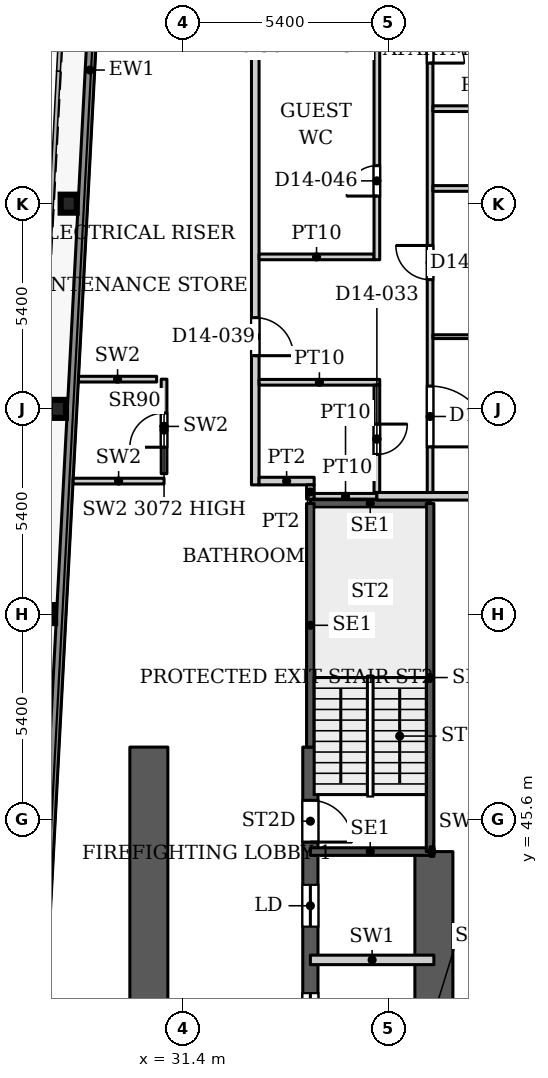
"""IFC4 building model, lengths in metres.
Left out: names, types, materials, properties, quantities, classifications, styles, units other than length and angle.
Written with IfcOpenShell. Run it as: python <this file> out.ifc"""

import sys

from ifc_helpers import new_model, si_unit, direction, frame, frame_2d, origin, origin_2d, place, context, subcontext, project, spatial, rectangle, i_section, extrude, source, transform, mapped, element, fill, save


model = new_model("IFC4")
c1 = context("Model", 3, precision=1e-05, world=origin(), true_north=direction((0.0, 1.0)))
c2 = subcontext(c1, "Body", "Model", "MODEL_VIEW")
j1 = project(units=[si_unit("LENGTHUNIT", "METRE"), si_unit("PLANEANGLEUNIT", "RADIAN")], contexts=[c1])
p1 = place(None, origin())
s1 = spatial("IfcSite", under=j1, at=p1, CompositionType="ELEMENT")
p2 = place(p1, origin())
s2 = spatial("IfcBuilding", under=s1, at=p2, CompositionType="ELEMENT")
p3 = place(p2, frame((0.0, 0.0, 65.6)))
s3 = spatial("IfcBuildingStorey", under=s2, at=p3, CompositionType="ELEMENT", Elevation=65.6)
for number, where, z_axis, x_axis in (
    (1, (27.822, 51.0, 0.0), (0.0, 0.0, 1.0), (1.0, 0.0, 0.0)),
    (2, (28.106, 56.4, 0.0), (0.0, 0.0, 1.0), (1.0, 0.0, 0.0)),
    (3, (28.39, 61.8, 0.0), (0.0, 0.0, 1.0), (1.0, 0.0, 0.0)),
):
    element("IfcColumn", number, at=place(p3, frame(where, z_axis=z_axis, x_axis=x_axis)), inside=s3, PredefinedType="COLUMN", context=c2, shape_type="SweptSolid", body=[
        extrude(i_section(OverallWidth=0.424, OverallDepth=0.474, WebThickness=0.048, FlangeThickness=0.077, FilletRadius=0.014, at=origin_2d()), origin(), (0.0, 0.0, 1.0), 3.9),
    ])
p4 = place(p3, frame((34.75, 29.05, 0.0), z_axis=(0.0, 0.0, 1.0), x_axis=(0.0, 1.0, 0.0)))
e4 = element("IfcWall", 4, at=p4, inside=s3, PredefinedType="SHEAR", context=c2, shape_type="SweptSolid", body=[
    extrude(rectangle(XDim=18.45, YDim=0.4, at=frame_2d((9.225, 0.0))), origin(), (0.0, 0.0, 1.0), 3.9),
])
p5 = place(p4, frame((8.025, 0.0, 0.0)))
e5 = element("IfcOpeningElement", 5, at=p5, cuts=e4, PredefinedType="OPENING", context=c2, shape_type="SweptSolid", body=[
    extrude(rectangle(XDim=1.1, YDim=2.2, at=frame_2d((0.55, 1.1))), frame((0.0, 0.21, 0.0), z_axis=(0.0, -1.0, 0.0), x_axis=(1.0, 0.0, 0.0)), (0.0, 0.0, 1.0), 0.42),
])
p6 = place(p4, frame((10.875, 0.0, 0.0)))
e6 = element("IfcOpeningElement", 6, at=p6, cuts=e4, PredefinedType="OPENING", context=c2, shape_type="SweptSolid", body=[
    extrude(rectangle(XDim=1.1, YDim=2.2, at=frame_2d((0.55, 1.1))), frame((0.0, 0.21, 0.0), z_axis=(0.0, -1.0, 0.0), x_axis=(1.0, 0.0, 0.0)), (0.0, 0.0, 1.0), 0.42),
])
p7 = place(p4, frame((13.725, 0.0, 0.0)))
e7 = element("IfcOpeningElement", 7, at=p7, cuts=e4, PredefinedType="OPENING", context=c2, shape_type="SweptSolid", body=[
    extrude(rectangle(XDim=1.1, YDim=2.2, at=frame_2d((0.55, 1.1))), frame((0.0, 0.21, 0.0), z_axis=(0.0, -1.0, 0.0), x_axis=(1.0, 0.0, 0.0)), (0.0, 0.0, 1.0), 0.42),
])
p8 = place(p4, frame((15.95, 0.0, 0.0)))
e8 = element("IfcOpeningElement", 8, at=p8, cuts=e4, PredefinedType="OPENING", context=c2, shape_type="SweptSolid", body=[
    extrude(rectangle(XDim=1.1, YDim=2.2, at=frame_2d((0.55, 1.1))), frame((0.0, 0.21, 0.0), z_axis=(0.0, -1.0, 0.0), x_axis=(1.0, 0.0, 0.0)), (0.0, 0.0, 1.0), 0.42),
])
p9 = place(p3, frame((38.0, 36.2, 0.0), z_axis=(0.0, 0.0, 1.0), x_axis=(0.0, 1.0, 0.0)))
e9 = element("IfcWall", 9, at=p9, inside=s3, PredefinedType="SHEAR", context=c2, shape_type="SweptSolid", body=[
    extrude(rectangle(XDim=8.55, YDim=1.0, at=frame_2d((4.275, 0.0))), origin(), (0.0, 0.0, 1.0), 3.9),
])
p10 = place(p3, frame((30.5, 29.05, 0.0), z_axis=(0.0, 0.0, 1.0), x_axis=(0.0, 1.0, 0.0)))
e10 = element("IfcWall", 10, at=p10, inside=s3, PredefinedType="SHEAR", context=c2, shape_type="SweptSolid", body=[
    extrude(rectangle(XDim=18.45, YDim=1.0, at=frame_2d((9.225, 0.0))), origin(), (0.0, 0.0, 1.0), 3.9),
])
p11 = place(p10, frame((1.147, 0.0, 0.0)))
e11 = element("IfcOpeningElement", 11, at=p11, cuts=e10, PredefinedType="OPENING", context=c2, shape_type="SweptSolid", body=[
    extrude(rectangle(XDim=0.9, YDim=2.2, at=frame_2d((0.45, 1.1))), frame((0.0, 0.51, 0.0), z_axis=(0.0, -1.0, 0.0), x_axis=(1.0, 0.0, 0.0)), (0.0, 0.0, 1.0), 1.02),
])
p12 = place(p10, frame((7.925, 0.0, 0.0)))
e12 = element("IfcOpeningElement", 12, at=p12, cuts=e10, PredefinedType="OPENING", context=c2, shape_type="SweptSolid", body=[
    extrude(rectangle(XDim=0.9, YDim=2.2, at=frame_2d((0.45, 1.1))), frame((0.0, 0.51, 0.0), z_axis=(0.0, -1.0, 0.0), x_axis=(1.0, 0.0, 0.0)), (0.0, 0.0, 1.0), 1.02),
])
p13 = place(p3, frame((27.195, 31.969, 0.0), z_axis=(0.0, 0.0, 1.0), x_axis=(0.052554995867, 0.998618031286, 0.0)))
e13 = element("IfcWall", 13, at=p13, inside=s3, PredefinedType="SOLIDWALL", context=c2, shape_type="SweptSolid", body=[
    extrude(rectangle(XDim=66.787, YDim=0.25, at=frame_2d((33.394, 0.0))), origin(), (0.0, 0.0, 1.0), 3.75),
])
for number, where, z_axis, x_axis in (
    (14, (34.75, 44.75, 0.0), (0.0, 0.0, 1.0), (1.0, 0.0, 0.0)),
    (15, (34.75, 53.91, 0.0), (0.0, 0.0, 1.0), (1.0, 0.0, 0.0)),
):
    element("IfcWall", number, at=place(p3, frame(where, z_axis=z_axis, x_axis=x_axis)), inside=s3, PredefinedType="SHEAR", context=c2, shape_type="SweptSolid", body=[
        extrude(rectangle(XDim=3.15, YDim=0.2, at=frame_2d((1.575, 0.0))), origin(), (0.0, 0.0, 1.0), 3.9),
    ])
p14 = place(p3, frame((34.75, 47.5, 0.0), z_axis=(0.0, 0.0, 1.0), x_axis=(0.0, 1.0, 0.0)))
e16 = element("IfcWall", 16, at=p14, inside=s3, PredefinedType="SHEAR", context=c2, shape_type="SweptSolid", body=[
    extrude(rectangle(XDim=6.41, YDim=0.2, at=frame_2d((3.205, 0.0))), origin(), (0.0, 0.0, 1.0), 3.9),
])
p15 = place(p3, frame((37.9, 44.75, 0.0), z_axis=(0.0, 0.0, 1.0), x_axis=(0.0, 1.0, 0.0)))
e17 = element("IfcWall", 17, at=p15, inside=s3, PredefinedType="SHEAR", context=c2, shape_type="SweptSolid", body=[
    extrude(rectangle(XDim=9.16, YDim=0.2, at=frame_2d((4.58, 0.0))), origin(), (0.0, 0.0, 1.0), 3.9),
])
p16 = place(p3, frame((34.75, 41.9, 0.0), z_axis=(0.0, 0.0, 1.0), x_axis=(1.0, 0.0, 0.0)))
e18 = element("IfcWall", 18, at=p16, inside=s3, PredefinedType="PARTITIONING", context=c2, shape_type="SweptSolid", body=[
    extrude(rectangle(XDim=3.25, YDim=0.25, at=frame_2d((1.625, 0.0))), origin(), (0.0, 0.0, 1.0), 3.9),
])
p17 = place(p3, frame((37.9, 44.75, 0.0), z_axis=(0.0, 0.0, 1.0), x_axis=(1.0, 0.0, 0.0)))
e19 = element("IfcWall", 19, at=p17, inside=s3, PredefinedType="PARTITIONING", context=c2, shape_type="SweptSolid", body=[
    extrude(rectangle(XDim=0.1, YDim=0.25, at=frame_2d((0.05, 0.0))), origin(), (0.0, 0.0, 1.0), 3.9),
])
p18 = place(p3, frame((28.508, 54.5, 0.0), z_axis=(0.0, 0.0, 1.0), x_axis=(1.0, 0.0, 0.0)))
e20 = element("IfcWall", 20, at=p18, inside=s3, PredefinedType="PARTITIONING", context=c2, shape_type="SweptSolid", body=[
    extrude(rectangle(XDim=2.392, YDim=0.15, at=frame_2d((1.196, 0.0))), origin(), (0.0, 0.0, 1.0), 3.9),
])
p19 = place(p3, frame((30.9, 54.695, 0.0), z_axis=(0.0, 0.0, 1.0), x_axis=(0.0, 1.0, 0.0)))
e21 = element("IfcWall", 21, at=p19, inside=s3, PredefinedType="PARTITIONING", context=c2, shape_type="SweptSolid", body=[
    extrude(rectangle(XDim=2.487, YDim=0.15, at=frame_2d((1.243, 0.0))), origin(), (0.0, 0.0, 1.0), 3.072),
])
p20 = place(p19, frame((0.696, 0.0, 0.0)))
e22 = element("IfcOpeningElement", 22, at=p20, cuts=e21, PredefinedType="OPENING", context=c2, shape_type="SweptSolid", body=[
    extrude(rectangle(XDim=0.9, YDim=2.2, at=frame_2d((0.45, 1.1))), frame((0.0, 0.085, 0.0), z_axis=(0.0, -1.0, 0.0), x_axis=(1.0, 0.0, 0.0)), (0.0, 0.0, 1.0), 0.17),
])
p21 = place(p3, frame((28.649, 57.182, 0.0), z_axis=(0.0, 0.0, 1.0), x_axis=(1.0, 0.0, 0.0)))
e23 = element("IfcWall", 23, at=p21, inside=s3, PredefinedType="PARTITIONING", context=c2, shape_type="SweptSolid", body=[
    extrude(rectangle(XDim=2.056, YDim=0.15, at=frame_2d((1.028, 0.0))), origin(), (0.0, 0.0, 1.0), 3.9),
])
p22 = place(p3, frame((33.3, 54.4, 0.0), z_axis=(0.0, 0.0, 1.0), x_axis=(0.0, 1.0, 0.0)))
e24 = element("IfcWall", 24, at=p22, inside=s3, PredefinedType="PARTITIONING", context=c2, shape_type="SweptSolid", body=[
    extrude(rectangle(XDim=24.95, YDim=0.2, at=frame_2d((12.475, 0.0))), origin(), (0.0, 0.0, 1.0), 3.6),
])
p23 = place(p22, frame((3.4, 0.0, 0.0)))
e25 = element("IfcOpeningElement", 25, at=p23, cuts=e24, PredefinedType="OPENING", context=c2, shape_type="SweptSolid", body=[
    extrude(rectangle(XDim=1.0, YDim=2.1, at=frame_2d((0.5, 1.05))), frame((0.0, 0.11, 0.0), z_axis=(0.0, -1.0, 0.0), x_axis=(1.0, 0.0, 0.0)), (0.0, 0.0, 1.0), 0.22),
])
p24 = place(p3, frame((33.4, 54.5, 0.0), z_axis=(0.0, 0.0, 1.0), x_axis=(1.0, 0.0, 0.0)))
e26 = element("IfcWall", 26, at=p24, inside=s3, PredefinedType="PARTITIONING", context=c2, shape_type="SweptSolid", body=[
    extrude(rectangle(XDim=1.45, YDim=0.2, at=frame_2d((0.725, 0.0))), origin(), (0.0, 0.0, 1.0), 3.6),
])
p25 = place(p3, frame((33.4, 57.1, 0.0), z_axis=(0.0, 0.0, 1.0), x_axis=(1.0, 0.0, 0.0)))
e27 = element("IfcWall", 27, at=p25, inside=s3, PredefinedType="PARTITIONING", context=c2, shape_type="SweptSolid", body=[
    extrude(rectangle(XDim=3.175, YDim=0.15, at=frame_2d((1.587, 0.0))), origin(), (0.0, 0.0, 1.0), 3.6),
])
p26 = place(p3, frame((33.4, 60.4, 0.0), z_axis=(0.0, 0.0, 1.0), x_axis=(1.0, 0.0, 0.0)))
e28 = element("IfcWall", 28, at=p26, inside=s3, PredefinedType="PARTITIONING", context=c2, shape_type="SweptSolid", body=[
    extrude(rectangle(XDim=3.025, YDim=0.15, at=frame_2d((1.513, 0.0))), origin(), (0.0, 0.0, 1.0), 3.6),
])
p27 = place(p3, frame((34.75, 54.025, 0.0), z_axis=(0.0, 0.0, 1.0), x_axis=(0.0, 1.0, 0.0)))
e29 = element("IfcWall", 29, at=p27, inside=s3, PredefinedType="PARTITIONING", context=c2, shape_type="SweptSolid", body=[
    extrude(rectangle(XDim=0.375, YDim=0.2, at=frame_2d((0.188, 0.0))), origin(), (0.0, 0.0, 1.0), 3.6),
])
p28 = place(p3, frame((34.85, 54.1, 0.0), z_axis=(0.0, 0.0, 1.0), x_axis=(1.0, 0.0, 0.0)))
e30 = element("IfcWall", 30, at=p28, inside=s3, PredefinedType="PARTITIONING", context=c2, shape_type="SweptSolid", body=[
    extrude(rectangle(XDim=1.65, YDim=0.15, at=frame_2d((0.825, 0.0))), origin(), (0.0, 0.0, 1.0), 3.6),
])
p29 = place(p3, frame((36.5, 54.1, 0.0), z_axis=(0.0, 0.0, 1.0), x_axis=(1.0, 0.0, 0.0)))
e31 = element("IfcWall", 31, at=p29, inside=s3, PredefinedType="PARTITIONING", context=c2, shape_type="SweptSolid", body=[
    extrude(rectangle(XDim=9.4, YDim=0.2, at=frame_2d((4.7, 0.0))), origin(), (0.0, 0.0, 1.0), 3.6),
])
p30 = place(p3, frame((36.5, 54.2, 0.0), z_axis=(0.0, 0.0, 1.0), x_axis=(0.0, 1.0, 0.0)))
e32 = element("IfcWall", 32, at=p30, inside=s3, PredefinedType="PARTITIONING", context=c2, shape_type="SweptSolid", body=[
    extrude(rectangle(XDim=2.825, YDim=0.15, at=frame_2d((1.413, 0.0))), origin(), (0.0, 0.0, 1.0), 3.6),
])
p31 = place(p30, frame((1.0, 0.0, 0.0)))
e33 = element("IfcOpeningElement", 33, at=p31, cuts=e32, PredefinedType="OPENING", context=c2, shape_type="SweptSolid", body=[
    extrude(rectangle(XDim=0.8, YDim=2.1, at=frame_2d((0.4, 1.05))), frame((0.0, 0.085, 0.0), z_axis=(0.0, -1.0, 0.0), x_axis=(1.0, 0.0, 0.0)), (0.0, 0.0, 1.0), 0.17),
])
p32 = place(p3, frame((36.5, 60.325, 0.0), z_axis=(0.0, 0.0, 1.0), x_axis=(0.0, 1.0, 0.0)))
e34 = element("IfcWall", 34, at=p32, inside=s3, PredefinedType="PARTITIONING", context=c2, shape_type="SweptSolid", body=[
    extrude(rectangle(XDim=18.925, YDim=0.15, at=frame_2d((9.462, 0.0))), origin(), (0.0, 0.0, 1.0), 3.6),
])
p33 = place(p32, frame((8.075, 0.0, 0.0)))
e35 = element("IfcOpeningElement", 35, at=p33, cuts=e34, PredefinedType="OPENING", context=c2, shape_type="SweptSolid", body=[
    extrude(rectangle(XDim=0.8, YDim=2.1, at=frame_2d((0.4, 1.05))), frame((0.0, 0.085, 0.0), z_axis=(0.0, -1.0, 0.0), x_axis=(1.0, 0.0, 0.0)), (0.0, 0.0, 1.0), 0.17),
])
p34 = place(p32, frame((15.425, 0.0, 0.0)))
e36 = element("IfcOpeningElement", 36, at=p34, cuts=e34, PredefinedType="OPENING", context=c2, shape_type="SweptSolid", body=[
    extrude(rectangle(XDim=0.9, YDim=2.1, at=frame_2d((0.45, 1.05))), frame((0.0, 0.085, 0.0), z_axis=(0.0, -1.0, 0.0), x_axis=(1.0, 0.0, 0.0)), (0.0, 0.0, 1.0), 0.17),
])
p35 = place(p32, frame((12.275, 0.0, 0.0)))
e37 = element("IfcOpeningElement", 37, at=p35, cuts=e34, PredefinedType="OPENING", context=c2, shape_type="SweptSolid", body=[
    extrude(rectangle(XDim=0.8, YDim=2.1, at=frame_2d((0.4, 1.05))), frame((0.0, 0.085, 0.0), z_axis=(0.0, -1.0, 0.0), x_axis=(1.0, 0.0, 0.0)), (0.0, 0.0, 1.0), 0.17),
])
p36 = place(p32, frame((1.675, 0.0, 0.0)))
e38 = element("IfcOpeningElement", 38, at=p36, cuts=e34, PredefinedType="OPENING", context=c2, shape_type="SweptSolid", body=[
    extrude(rectangle(XDim=0.8, YDim=2.1, at=frame_2d((0.4, 1.05))), frame((0.0, 0.085, 0.0), z_axis=(0.0, -1.0, 0.0), x_axis=(1.0, 0.0, 0.0)), (0.0, 0.0, 1.0), 0.17),
])
p37 = place(p3, frame((37.9, 54.2, 0.0), z_axis=(0.0, 0.0, 1.0), x_axis=(0.0, 1.0, 0.0)))
e39 = element("IfcWall", 39, at=p37, inside=s3, PredefinedType="PARTITIONING", context=c2, shape_type="SweptSolid", body=[
    extrude(rectangle(XDim=25.05, YDim=0.15, at=frame_2d((12.525, 0.0))), origin(), (0.0, 0.0, 1.0), 3.6),
])
p38 = place(p37, frame((5.6, 0.0, 0.0)))
e40 = element("IfcOpeningElement", 40, at=p38, cuts=e39, PredefinedType="OPENING", context=c2, shape_type="SweptSolid", body=[
    extrude(rectangle(XDim=0.9, YDim=2.1, at=frame_2d((0.45, 1.05))), frame((0.0, 0.085, 0.0), z_axis=(0.0, -1.0, 0.0), x_axis=(1.0, 0.0, 0.0)), (0.0, 0.0, 1.0), 0.17),
])
p39 = place(p37, frame((14.9, 0.0, 0.0)))
e41 = element("IfcOpeningElement", 41, at=p39, cuts=e39, PredefinedType="OPENING", context=c2, shape_type="SweptSolid", body=[
    extrude(rectangle(XDim=0.9, YDim=2.1, at=frame_2d((0.45, 1.05))), frame((0.0, 0.085, 0.0), z_axis=(0.0, -1.0, 0.0), x_axis=(1.0, 0.0, 0.0)), (0.0, 0.0, 1.0), 0.17),
])
p40 = place(p37, frame((18.65, 0.0, 0.0)))
e42 = element("IfcOpeningElement", 42, at=p40, cuts=e39, PredefinedType="OPENING", context=c2, shape_type="SweptSolid", body=[
    extrude(rectangle(XDim=0.9, YDim=2.1, at=frame_2d((0.45, 1.05))), frame((0.0, 0.085, 0.0), z_axis=(0.0, -1.0, 0.0), x_axis=(1.0, 0.0, 0.0)), (0.0, 0.0, 1.0), 0.17),
])
p41 = place(p37, frame((22.5, 0.0, 0.0)))
e43 = element("IfcOpeningElement", 43, at=p41, cuts=e39, PredefinedType="OPENING", context=c2, shape_type="SweptSolid", body=[
    extrude(rectangle(XDim=1.0, YDim=2.1, at=frame_2d((0.5, 1.05))), frame((0.0, 0.085, 0.0), z_axis=(0.0, -1.0, 0.0), x_axis=(1.0, 0.0, 0.0)), (0.0, 0.0, 1.0), 0.17),
])
p42 = place(p37, frame((1.2, 0.0, 0.0)))
e44 = element("IfcOpeningElement", 44, at=p42, cuts=e39, PredefinedType="OPENING", context=c2, shape_type="SweptSolid", body=[
    extrude(rectangle(XDim=1.6, YDim=2.1, at=frame_2d((0.8, 1.05))), frame((0.0, 0.085, 0.0), z_axis=(0.0, -1.0, 0.0), x_axis=(1.0, 0.0, 0.0)), (0.0, 0.0, 1.0), 0.17),
])
p43 = place(p37, frame((11.3, 0.0, 0.0)))
e45 = element("IfcOpeningElement", 45, at=p43, cuts=e39, PredefinedType="OPENING", context=c2, shape_type="SweptSolid", body=[
    extrude(rectangle(XDim=0.9, YDim=2.1, at=frame_2d((0.45, 1.05))), frame((0.0, 0.085, 0.0), z_axis=(0.0, -1.0, 0.0), x_axis=(1.0, 0.0, 0.0)), (0.0, 0.0, 1.0), 0.17),
])
p44 = place(p3, frame((37.975, 58.3, 0.0), z_axis=(0.0, 0.0, 1.0), x_axis=(1.0, 0.0, 0.0)))
e46 = element("IfcWall", 46, at=p44, inside=s3, PredefinedType="PARTITIONING", context=c2, shape_type="SweptSolid", body=[
    extrude(rectangle(XDim=7.925, YDim=0.1, at=frame_2d((3.962, 0.0))), origin(), (0.0, 0.0, 1.0), 3.6),
])
p45 = place(p3, frame((37.975, 62.2, 0.0), z_axis=(0.0, 0.0, 1.0), x_axis=(1.0, 0.0, 0.0)))
e47 = element("IfcWall", 47, at=p45, inside=s3, PredefinedType="PARTITIONING", context=c2, shape_type="SweptSolid", body=[
    extrude(rectangle(XDim=7.925, YDim=0.15, at=frame_2d((3.962, 0.0))), origin(), (0.0, 0.0, 1.0), 3.6),
])
p46 = place(p3, frame((37.975, 64.3, 0.0), z_axis=(0.0, 0.0, 1.0), x_axis=(1.0, 0.0, 0.0)))
e48 = element("IfcWall", 48, at=p46, inside=s3, PredefinedType="PARTITIONING", context=c2, shape_type="SweptSolid", body=[
    extrude(rectangle(XDim=2.8, YDim=0.15, at=frame_2d((1.4, 0.0))), origin(), (0.0, 0.0, 1.0), 3.6),
])
m1 = source(origin(), c2, "Body", "SweptSolid", [
    extrude(rectangle(XDim=1.1, YDim=2.2, at=frame_2d((0.55, 1.1))), frame((0.0, 0.025, 0.0), z_axis=(0.0, -1.0, 0.0), x_axis=(1.0, 0.0, 0.0)), (0.0, 0.0, 1.0), 0.05),
])
p47 = place(p6, origin())
e49 = element("IfcDoor", 49, at=p47, inside=s3, OperationType="SLIDING_TO_LEFT", PredefinedType="DOOR", context=c2, shape_type="MappedRepresentation", body=[
    mapped(m1, transform((0.0, 0.0, 0.0), x_axis=(1.0, 0.0, 0.0), y_axis=(0.0, 1.0, 0.0), z_axis=(0.0, 0.0, 1.0), scale=1.0)),
])
fill(e6, e49)
p48 = place(p7, origin())
e50 = element("IfcDoor", 50, at=p48, inside=s3, OperationType="SLIDING_TO_LEFT", PredefinedType="DOOR", context=c2, shape_type="MappedRepresentation", body=[
    mapped(m1, transform((0.0, 0.0, 0.0), x_axis=(1.0, 0.0, 0.0), y_axis=(0.0, 1.0, 0.0), z_axis=(0.0, 0.0, 1.0), scale=1.0)),
])
fill(e7, e50)
m2 = source(origin(), c2, "Body", "SweptSolid", [
    extrude(rectangle(XDim=0.9, YDim=2.2, at=frame_2d((0.45, 1.1))), frame((0.0, 0.025, 0.0), z_axis=(0.0, -1.0, 0.0), x_axis=(1.0, 0.0, 0.0)), (0.0, 0.0, 1.0), 0.05),
])
p49 = place(p20, origin())
e51 = element("IfcDoor", 51, at=p49, inside=s3, OperationType="SINGLE_SWING_LEFT", PredefinedType="DOOR", context=c2, shape_type="MappedRepresentation", body=[
    mapped(m2, transform((0.0, 0.0, 0.0), x_axis=(1.0, 0.0, 0.0), y_axis=(0.0, 1.0, 0.0), z_axis=(0.0, 0.0, 1.0), scale=1.0)),
])
fill(e22, e51)
m3 = source(origin(), c2, "Body", "SweptSolid", [
    extrude(rectangle(XDim=1.1, YDim=2.2, at=frame_2d((0.55, 1.1))), frame((0.0, 0.025, 0.0), z_axis=(0.0, -1.0, 0.0), x_axis=(1.0, 0.0, 0.0)), (0.0, 0.0, 1.0), 0.05),
])
p50 = place(p8, origin())
e52 = element("IfcDoor", 52, at=p50, inside=s3, OperationType="SINGLE_SWING_RIGHT", PredefinedType="DOOR", context=c2, shape_type="MappedRepresentation", body=[
    mapped(m3, transform((0.0, 0.0, 0.0), x_axis=(1.0, 0.0, 0.0), y_axis=(0.0, 1.0, 0.0), z_axis=(0.0, 0.0, 1.0), scale=1.0)),
])
fill(e8, e52)
m4 = source(origin(), c2, "Body", "SweptSolid", [
    extrude(rectangle(XDim=0.8, YDim=2.1, at=frame_2d((0.4, 1.05))), frame((0.0, 0.025, 0.0), z_axis=(0.0, -1.0, 0.0), x_axis=(1.0, 0.0, 0.0)), (0.0, 0.0, 1.0), 0.05),
])
p51 = place(p31, origin())
e53 = element("IfcDoor", 53, at=p51, inside=s3, OperationType="SINGLE_SWING_RIGHT", PredefinedType="DOOR", context=c2, shape_type="MappedRepresentation", body=[
    mapped(m4, transform((0.0, 0.0, 0.0), x_axis=(1.0, 0.0, 0.0), y_axis=(0.0, 1.0, 0.0), z_axis=(0.0, 0.0, 1.0), scale=1.0)),
])
fill(e33, e53)
m5 = source(origin(), c2, "Body", "SweptSolid", [
    extrude(rectangle(XDim=0.9, YDim=2.1, at=frame_2d((0.45, 1.05))), frame((0.0, 0.025, 0.0), z_axis=(0.0, -1.0, 0.0), x_axis=(1.0, 0.0, 0.0)), (0.0, 0.0, 1.0), 0.05),
])
p52 = place(p38, origin())
e54 = element("IfcDoor", 54, at=p52, inside=s3, OperationType="SINGLE_SWING_LEFT", PredefinedType="DOOR", context=c2, shape_type="MappedRepresentation", body=[
    mapped(m5, transform((0.0, 0.0, 0.0), x_axis=(1.0, 0.0, 0.0), y_axis=(0.0, 1.0, 0.0), z_axis=(0.0, 0.0, 1.0), scale=1.0)),
])
fill(e40, e54)
m6 = source(origin(), c2, "Body", "SweptSolid", [
    extrude(rectangle(XDim=1.0, YDim=2.1, at=frame_2d((0.5, 1.05))), frame((0.0, 0.025, 0.0), z_axis=(0.0, -1.0, 0.0), x_axis=(1.0, 0.0, 0.0)), (0.0, 0.0, 1.0), 0.05),
])
p53 = place(p23, origin())
e55 = element("IfcDoor", 55, at=p53, inside=s3, OperationType="SINGLE_SWING_RIGHT", PredefinedType="DOOR", context=c2, shape_type="MappedRepresentation", body=[
    mapped(m6, transform((0.0, 0.0, 0.0), x_axis=(1.0, 0.0, 0.0), y_axis=(0.0, 1.0, 0.0), z_axis=(0.0, 0.0, 1.0), scale=1.0)),
])
fill(e25, e55)
m7 = source(origin(), c2, "Body", "SweptSolid", [
    extrude(rectangle(XDim=1.6, YDim=2.1, at=frame_2d((0.8, 1.05))), frame((0.0, 0.025, 0.0), z_axis=(0.0, -1.0, 0.0), x_axis=(1.0, 0.0, 0.0)), (0.0, 0.0, 1.0), 0.05),
])
p54 = place(p42, origin())
e56 = element("IfcDoor", 56, at=p54, inside=s3, OperationType="DOUBLE_DOOR_SINGLE_SWING", PredefinedType="DOOR", context=c2, shape_type="MappedRepresentation", body=[
    mapped(m7, transform((0.0, 0.0, 0.0), x_axis=(1.0, 0.0, 0.0), y_axis=(0.0, 1.0, 0.0), z_axis=(0.0, 0.0, 1.0), scale=1.0)),
])
fill(e44, e56)
p55 = place(p43, origin())
e57 = element("IfcDoor", 57, at=p55, inside=s3, OperationType="SINGLE_SWING_RIGHT", PredefinedType="DOOR", context=c2, shape_type="MappedRepresentation", body=[
    mapped(m5, transform((0.0, 0.0, 0.0), x_axis=(1.0, 0.0, 0.0), y_axis=(0.0, 1.0, 0.0), z_axis=(0.0, 0.0, 1.0), scale=1.0)),
])
fill(e45, e57)
p56 = place(p36, origin())
e58 = element("IfcDoor", 58, at=p56, inside=s3, OperationType="SINGLE_SWING_LEFT", PredefinedType="DOOR", context=c2, shape_type="MappedRepresentation", body=[
    mapped(m4, transform((0.0, 0.0, 0.0), x_axis=(1.0, 0.0, 0.0), y_axis=(0.0, 1.0, 0.0), z_axis=(0.0, 0.0, 1.0), scale=1.0)),
])
fill(e38, e58)
save(model, sys.argv[1])
